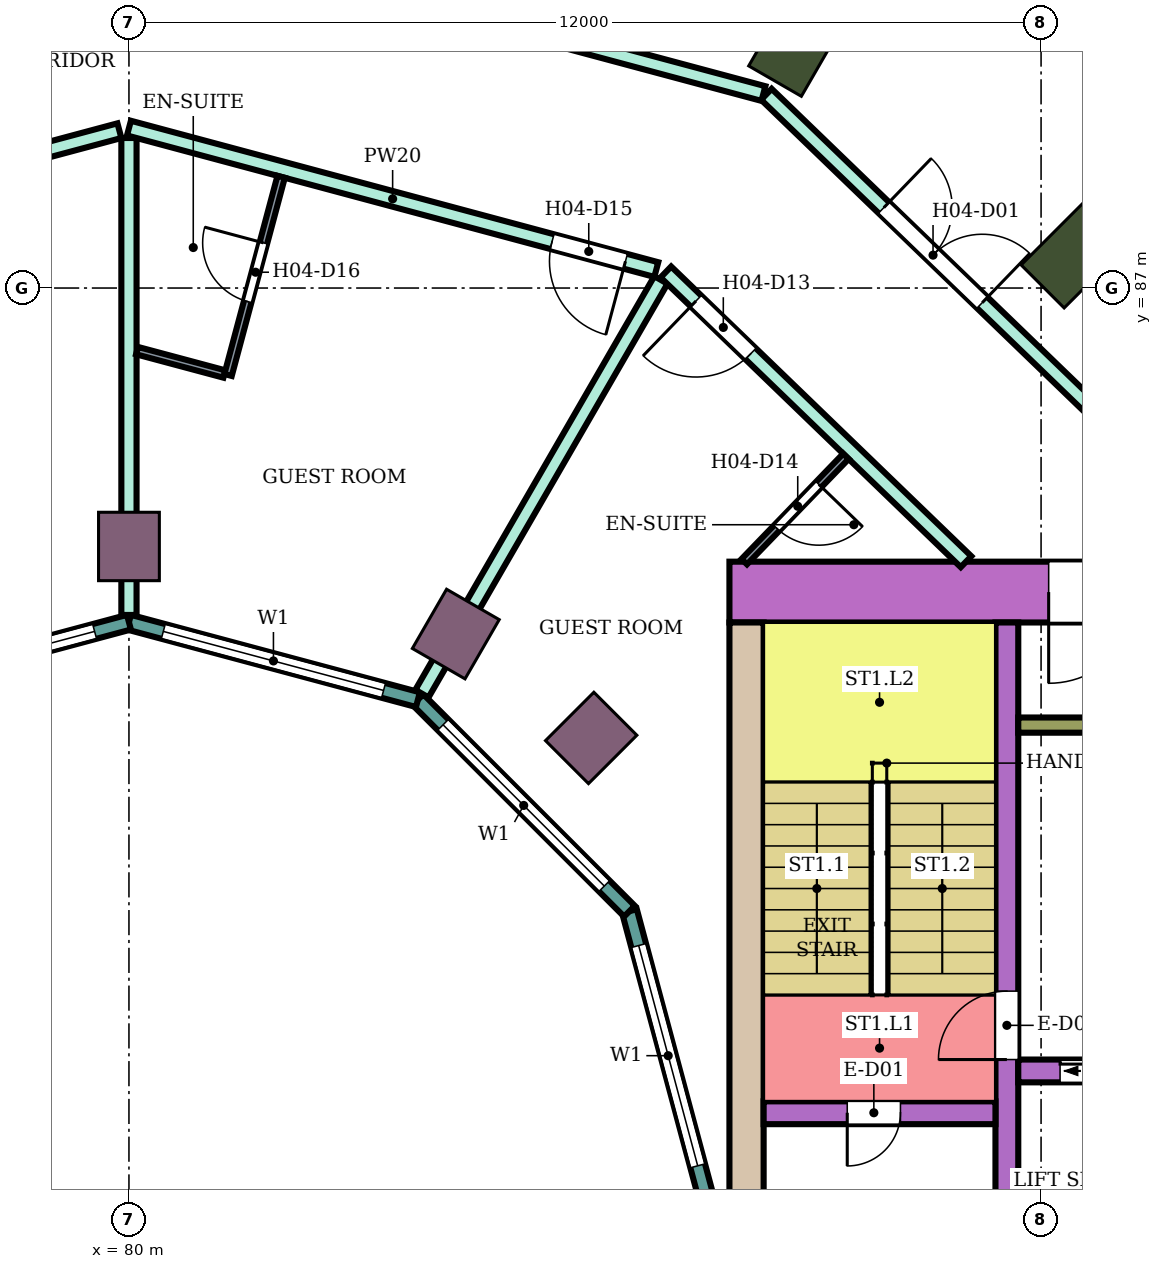
"""IFC4 building model, lengths in metres.
Left out: names, types, materials, properties, quantities, classifications, styles, units other than length and angle.
Written with IfcOpenShell. Run it as: python <this file> out.ifc"""

import sys

from ifc_helpers import new_model, si_unit, direction, frame, frame_2d, origin, origin_2d, place, context, subcontext, project, spatial, rectangle, extrude, element, fill, save


model = new_model("IFC4")
c1 = context("Model", 3, precision=1e-05, world=origin(), true_north=direction((0.0, 1.0)))
c2 = subcontext(c1, "Body", "Model", "MODEL_VIEW")
j1 = project(units=[si_unit("LENGTHUNIT", "METRE"), si_unit("PLANEANGLEUNIT", "RADIAN")], contexts=[c1])
p1 = place(None, origin())
s1 = spatial("IfcSite", under=j1, at=p1, CompositionType="ELEMENT")
p2 = place(p1, origin())
s2 = spatial("IfcBuilding", under=s1, at=p2, CompositionType="ELEMENT")
p3 = place(p2, frame((0.0, 0.0, 63.0)))
s3 = spatial("IfcBuildingStorey", under=s2, at=p3, CompositionType="ELEMENT", Elevation=63.0)
for number, where, z_axis, x_axis in (
    (1, (92.445, 87.445, 0.0), (0.0, 0.0, 1.0), (0.707, 0.707, 0.0)),
    (2, (88.8, 90.242, 0.0), (0.0, 0.0, 1.0), (0.5, 0.866, 0.0)),
):
    element("IfcColumn", number, at=place(p3, frame(where, z_axis=z_axis, x_axis=x_axis)), inside=s3, PredefinedType="COLUMN", context=c2, shape_type="SweptSolid", body=[
        extrude(rectangle(XDim=1.2, YDim=0.8, at=origin_2d()), origin(), (0.0, 0.0, 1.0), 3.8),
    ])
for number, where, z_axis, x_axis in (
    (3, (86.081, 81.081, 0.0), (0.0, 0.0, 1.0), (0.707, 0.707, 0.0)),
    (4, (84.3, 82.448, 0.0), (0.0, 0.0, 1.0), (0.5, 0.866, 0.0)),
    (5, (80.0, 83.6, 0.0), (0.0, 0.0, 1.0), (0.0, 1.0, 0.0)),
):
    element("IfcColumn", number, at=place(p3, frame(where, z_axis=z_axis, x_axis=x_axis)), inside=s3, PredefinedType="COLUMN", context=c2, shape_type="SweptSolid", body=[
        extrude(rectangle(XDim=0.9, YDim=0.8, at=origin_2d()), origin(), (0.0, 0.0, 1.0), 3.8),
    ])
p4 = place(p3, frame((87.9, 83.0, 0.0), z_axis=(0.0, 0.0, 1.0), x_axis=(1.0, 0.0, 0.0)))
e6 = element("IfcWall", 6, at=p4, inside=s3, PredefinedType="SHEAR", context=c2, shape_type="SweptSolid", body=[
    extrude(rectangle(XDim=14.7, YDim=0.8, at=frame_2d((7.35, 0.0))), origin(), (0.0, 0.0, 1.0), 3.48),
])
p5 = place(p4, frame((4.2, 0.0, 0.0)))
e7 = element("IfcOpeningElement", 7, at=p5, cuts=e6, PredefinedType="OPENING", context=c2, shape_type="SweptSolid", body=[
    extrude(rectangle(XDim=2.4, YDim=2.4, at=frame_2d((1.2, 1.2))), frame((0.0, 0.41, 0.0), z_axis=(0.0, -1.0, 0.0), x_axis=(1.0, 0.0, 0.0)), (0.0, 0.0, 1.0), 0.82),
])
p6 = place(p3, frame((88.125, 75.0, 0.0), z_axis=(0.0, 0.0, 1.0), x_axis=(0.0, 1.0, 0.0)))
e8 = element("IfcWall", 8, at=p6, inside=s3, PredefinedType="SHEAR", context=c2, shape_type="SweptSolid", body=[
    extrude(rectangle(XDim=7.6, YDim=0.45, at=frame_2d((3.8, 0.0))), origin(), (0.0, 0.0, 1.0), 3.48),
])
p7 = place(p3, frame((91.55, 75.0, 0.0), z_axis=(0.0, 0.0, 1.0), x_axis=(0.0, 1.0, 0.0)))
e9 = element("IfcWall", 9, at=p7, inside=s3, PredefinedType="SHEAR", context=c2, shape_type="SweptSolid", body=[
    extrude(rectangle(XDim=7.6, YDim=0.3, at=frame_2d((3.8, 0.0))), origin(), (0.0, 0.0, 1.0), 3.48),
])
p8 = place(p7, frame((1.85, 0.0, 0.0)))
e10 = element("IfcOpeningElement", 10, at=p8, cuts=e9, PredefinedType="OPENING", context=c2, shape_type="SweptSolid", body=[
    extrude(rectangle(XDim=0.9, YDim=2.1, at=frame_2d((0.45, 1.05))), frame((0.0, 0.16, 0.0), z_axis=(0.0, -1.0, 0.0), x_axis=(1.0, 0.0, 0.0)), (0.0, 0.0, 1.0), 0.32),
])
p9 = place(p3, frame((88.35, 76.15, 0.0), z_axis=(0.0, 0.0, 1.0), x_axis=(1.0, 0.0, 0.0)))
e11 = element("IfcWall", 11, at=p9, inside=s3, PredefinedType="SHEAR", context=c2, shape_type="SweptSolid", body=[
    extrude(rectangle(XDim=3.05, YDim=0.3, at=frame_2d((1.525, 0.0))), origin(), (0.0, 0.0, 1.0), 3.48),
])
p10 = place(p9, frame((1.1, 0.0, 0.0)))
e12 = element("IfcOpeningElement", 12, at=p10, cuts=e11, PredefinedType="OPENING", context=c2, shape_type="SweptSolid", body=[
    extrude(rectangle(XDim=0.7, YDim=2.0, at=frame_2d((0.35, 1.0))), frame((0.0, 0.16, 0.0), z_axis=(0.0, -1.0, 0.0), x_axis=(1.0, 0.0, 0.0)), (0.0, 0.0, 1.0), 0.32),
])
p11 = place(p3, frame((91.7, 76.7, 0.0), z_axis=(0.0, 0.0, 1.0), x_axis=(1.0, 0.0, 0.0)))
e13 = element("IfcWall", 13, at=p11, inside=s3, PredefinedType="SHEAR", context=c2, shape_type="SweptSolid", body=[
    extrude(rectangle(XDim=10.9, YDim=0.3, at=frame_2d((5.45, 0.0))), origin(), (0.0, 0.0, 1.0), 3.48),
])
p12 = place(p11, frame((0.55, 0.0, 0.0)))
e14 = element("IfcOpeningElement", 14, at=p12, cuts=e13, PredefinedType="OPENING", context=c2, shape_type="SweptSolid", body=[
    extrude(rectangle(XDim=1.1, YDim=2.1, at=frame_2d((0.55, 1.05))), frame((0.0, 0.16, 0.0), z_axis=(0.0, -1.0, 0.0), x_axis=(1.0, 0.0, 0.0)), (0.0, 0.0, 1.0), 0.32),
])
p13 = place(p11, frame((8.1, 0.0, 0.0)))
e15 = element("IfcOpeningElement", 15, at=p13, cuts=e13, PredefinedType="OPENING", context=c2, shape_type="SweptSolid", body=[
    extrude(rectangle(XDim=1.0, YDim=2.1, at=frame_2d((0.5, 1.05))), frame((0.0, 0.16, 0.0), z_axis=(0.0, -1.0, 0.0), x_axis=(1.0, 0.0, 0.0)), (0.0, 0.0, 1.0), 0.32),
])
p14 = place(p3, frame((91.7, 81.25, 0.0), z_axis=(0.0, 0.0, 1.0), x_axis=(1.0, 0.0, 0.0)))
e16 = element("IfcWall", 16, at=p14, inside=s3, PredefinedType="SHEAR", context=c2, shape_type="SweptSolid", body=[
    extrude(rectangle(XDim=4.65, YDim=0.2, at=frame_2d((2.325, 0.0))), origin(), (0.0, 0.0, 1.0), 3.48),
])
p15 = place(p3, frame((87.604, 75.0, 0.0), z_axis=(0.0, 0.0, 1.0), x_axis=(-0.258789828301, 0.965933654434, 0.0)))
e17 = element("IfcWall", 17, at=p15, inside=s3, PredefinedType="NOTDEFINED", context=c2, shape_type="SweptSolid", body=[
    extrude(rectangle(XDim=3.936, YDim=0.2, at=frame_2d((1.968, 0.0))), origin(), (0.0, 0.0, 1.0), 3.8),
])
p16 = place(p15, frame((0.468, 0.0, 0.9)))
e18 = element("IfcOpeningElement", 18, at=p16, cuts=e17, PredefinedType="OPENING", context=c2, shape_type="SweptSolid", body=[
    extrude(rectangle(XDim=3.0, YDim=2.3, at=frame_2d((1.5, 1.15))), frame((0.0, 0.11, 0.0), z_axis=(0.0, -1.0, 0.0), x_axis=(1.0, 0.0, 0.0)), (0.0, 0.0, 1.0), 0.22),
])
p17 = place(p3, frame((86.585, 78.802, 0.0), z_axis=(0.0, 0.0, 1.0), x_axis=(-0.707106781187, 0.707106781187, 0.0)))
e19 = element("IfcWall", 19, at=p17, inside=s3, PredefinedType="NOTDEFINED", context=c2, shape_type="SweptSolid", body=[
    extrude(rectangle(XDim=3.936, YDim=0.2, at=frame_2d((1.968, 0.0))), origin(), (0.0, 0.0, 1.0), 3.8),
])
p18 = place(p17, frame((0.468, 0.0, 0.9)))
e20 = element("IfcOpeningElement", 20, at=p18, cuts=e19, PredefinedType="OPENING", context=c2, shape_type="SweptSolid", body=[
    extrude(rectangle(XDim=3.0, YDim=2.3, at=frame_2d((1.5, 1.15))), frame((0.0, 0.11, 0.0), z_axis=(0.0, -1.0, 0.0), x_axis=(1.0, 0.0, 0.0)), (0.0, 0.0, 1.0), 0.22),
])
p19 = place(p3, frame((83.802, 81.585, 0.0), z_axis=(0.0, 0.0, 1.0), x_axis=(-0.965933654434, 0.258789828301, 0.0)))
e21 = element("IfcWall", 21, at=p19, inside=s3, PredefinedType="NOTDEFINED", context=c2, shape_type="SweptSolid", body=[
    extrude(rectangle(XDim=3.936, YDim=0.2, at=frame_2d((1.968, 0.0))), origin(), (0.0, 0.0, 1.0), 3.8),
])
p20 = place(p19, frame((0.468, 0.0, 0.9)))
e22 = element("IfcOpeningElement", 22, at=p20, cuts=e21, PredefinedType="OPENING", context=c2, shape_type="SweptSolid", body=[
    extrude(rectangle(XDim=3.0, YDim=2.3, at=frame_2d((1.5, 1.15))), frame((0.0, 0.11, 0.0), z_axis=(0.0, -1.0, 0.0), x_axis=(1.0, 0.0, 0.0)), (0.0, 0.0, 1.0), 0.22),
])
p21 = place(p3, frame((80.0, 82.604, 0.0), z_axis=(0.0, 0.0, 1.0), x_axis=(-0.965933654434, -0.258789828301, 0.0)))
e23 = element("IfcWall", 23, at=p21, inside=s3, PredefinedType="NOTDEFINED", context=c2, shape_type="SweptSolid", body=[
    extrude(rectangle(XDim=3.936, YDim=0.2, at=frame_2d((1.968, 0.0))), origin(), (0.0, 0.0, 1.0), 3.8),
])
p22 = place(p21, frame((0.468, 0.0, 0.9)))
e24 = element("IfcOpeningElement", 24, at=p22, cuts=e23, PredefinedType="OPENING", context=c2, shape_type="SweptSolid", body=[
    extrude(rectangle(XDim=3.0, YDim=2.3, at=frame_2d((1.5, 1.15))), frame((0.0, 0.11, 0.0), z_axis=(0.0, -1.0, 0.0), x_axis=(1.0, 0.0, 0.0)), (0.0, 0.0, 1.0), 0.22),
])
p23 = place(p3, frame((71.614, 89.55, 0.0), z_axis=(0.0, 0.0, 1.0), x_axis=(0.965982156828, 0.258608725086, 0.0)))
e25 = element("IfcWall", 25, at=p23, inside=s3, PredefinedType="PARTITIONING", context=c2, shape_type="SweptSolid", body=[
    extrude(rectangle(XDim=8.592, YDim=0.2, at=frame_2d((4.296, 0.0))), origin(), (0.0, 0.0, 1.0), 3.35),
])
p24 = place(p23, frame((4.865, 0.0, 0.0)))
e26 = element("IfcOpeningElement", 26, at=p24, cuts=e25, PredefinedType="OPENING", context=c2, shape_type="SweptSolid", body=[
    extrude(rectangle(XDim=1.0, YDim=2.1, at=frame_2d((0.5, 1.05))), frame((0.0, 0.11, 0.0), z_axis=(0.0, -1.0, 0.0), x_axis=(1.0, 0.0, 0.0)), (0.0, 0.0, 1.0), 0.22),
])
p25 = place(p23, frame((2.804, 0.0, 0.0)))
e27 = element("IfcOpeningElement", 27, at=p25, cuts=e25, PredefinedType="OPENING", context=c2, shape_type="SweptSolid", body=[
    extrude(rectangle(XDim=1.0, YDim=2.1, at=frame_2d((0.5, 1.05))), frame((0.0, 0.11, 0.0), z_axis=(0.0, -1.0, 0.0), x_axis=(1.0, 0.0, 0.0)), (0.0, 0.0, 1.0), 0.22),
])
p26 = place(p3, frame((73.071, 87.247, 0.0), z_axis=(0.0, 0.0, 1.0), x_axis=(0.965914318977, 0.258861987157, 0.0)))
e28 = element("IfcWall", 28, at=p26, inside=s3, PredefinedType="PARTITIONING", context=c2, shape_type="SweptSolid", body=[
    extrude(rectangle(XDim=7.043, YDim=0.2, at=frame_2d((3.521, 0.0))), origin(), (0.0, 0.0, 1.0), 3.35),
])
p27 = place(p26, frame((3.067, 0.0, 0.0)))
e29 = element("IfcOpeningElement", 29, at=p27, cuts=e28, PredefinedType="OPENING", context=c2, shape_type="SweptSolid", body=[
    extrude(rectangle(XDim=0.9, YDim=2.1, at=frame_2d((0.45, 1.05))), frame((0.0, 0.11, 0.0), z_axis=(0.0, -1.0, 0.0), x_axis=(1.0, 0.0, 0.0)), (0.0, 0.0, 1.0), 0.22),
])
p28 = place(p3, frame((80.0, 82.699, 0.0), z_axis=(0.0, 0.0, 1.0), x_axis=(0.0, 1.0, 0.0)))
e30 = element("IfcWall", 30, at=p28, inside=s3, PredefinedType="PARTITIONING", context=c2, shape_type="SweptSolid", body=[
    extrude(rectangle(XDim=6.275, YDim=0.2, at=frame_2d((3.138, 0.0))), origin(), (0.0, 0.0, 1.0), 3.35),
])
p29 = place(p3, frame((80.0, 89.104, 0.0), z_axis=(0.0, 0.0, 1.0), x_axis=(0.965854247166, -0.25908603442, 0.0)))
e31 = element("IfcWall", 31, at=p29, inside=s3, PredefinedType="PARTITIONING", context=c2, shape_type="SweptSolid", body=[
    extrude(rectangle(XDim=7.183, YDim=0.2, at=frame_2d((3.592, 0.0))), origin(), (0.0, 0.0, 1.0), 3.35),
])
p30 = place(p29, frame((5.763, 0.0, 0.0)))
e32 = element("IfcOpeningElement", 32, at=p30, cuts=e31, PredefinedType="OPENING", context=c2, shape_type="SweptSolid", body=[
    extrude(rectangle(XDim=1.0, YDim=2.1, at=frame_2d((0.5, 1.05))), frame((0.0, 0.11, 0.0), z_axis=(0.0, -1.0, 0.0), x_axis=(1.0, 0.0, 0.0)), (0.0, 0.0, 1.0), 0.22),
])
p31 = place(p3, frame((80.0, 91.796, 0.0), z_axis=(0.0, 0.0, 1.0), x_axis=(0.965891796243, -0.258946013582, 0.0)))
e33 = element("IfcWall", 33, at=p31, inside=s3, PredefinedType="PARTITIONING", context=c2, shape_type="SweptSolid", body=[
    extrude(rectangle(XDim=8.642, YDim=0.2, at=frame_2d((4.321, 0.0))), origin(), (0.0, 0.0, 1.0), 3.35),
])
p32 = place(p31, frame((2.817, 0.0, 0.0)))
e34 = element("IfcOpeningElement", 34, at=p32, cuts=e33, PredefinedType="OPENING", context=c2, shape_type="SweptSolid", body=[
    extrude(rectangle(XDim=1.0, YDim=2.1, at=frame_2d((0.5, 1.05))), frame((0.0, 0.11, 0.0), z_axis=(0.0, -1.0, 0.0), x_axis=(1.0, 0.0, 0.0)), (0.0, 0.0, 1.0), 0.22),
])
p33 = place(p3, frame((83.854, 81.664, 0.0), z_axis=(0.0, 0.0, 1.0), x_axis=(0.500224530691, 0.865895732115, 0.0)))
e35 = element("IfcWall", 35, at=p33, inside=s3, PredefinedType="PARTITIONING", context=c2, shape_type="SweptSolid", body=[
    extrude(rectangle(XDim=6.285, YDim=0.2, at=frame_2d((3.143, 0.0))), origin(), (0.0, 0.0, 1.0), 3.35),
])
p34 = place(p3, frame((87.064, 87.211, 0.0), z_axis=(0.0, 0.0, 1.0), x_axis=(0.719540958932, -0.694450004262, 0.0)))
e36 = element("IfcWall", 36, at=p34, inside=s3, PredefinedType="PARTITIONING", context=c2, shape_type="SweptSolid", body=[
    extrude(rectangle(XDim=5.488, YDim=0.2, at=frame_2d((2.744, 0.0))), origin(), (0.0, 0.0, 1.0), 3.35),
])
p35 = place(p34, frame((0.55, 0.0, 0.0)))
e37 = element("IfcOpeningElement", 37, at=p35, cuts=e36, PredefinedType="OPENING", context=c2, shape_type="SweptSolid", body=[
    extrude(rectangle(XDim=1.0, YDim=2.1, at=frame_2d((0.5, 1.05))), frame((0.0, 0.11, 0.0), z_axis=(0.0, -1.0, 0.0), x_axis=(1.0, 0.0, 0.0)), (0.0, 0.0, 1.0), 0.22),
])
p36 = place(p3, frame((88.386, 89.549, 0.0), z_axis=(0.0, 0.0, 1.0), x_axis=(0.719560576741, -0.694429677073, 0.0)))
e38 = element("IfcWall", 38, at=p36, inside=s3, PredefinedType="PARTITIONING", context=c2, shape_type="SweptSolid", body=[
    extrude(rectangle(XDim=6.635, YDim=0.2, at=frame_2d((3.318, 0.0))), origin(), (0.0, 0.0, 1.0), 3.35),
])
p37 = place(p36, frame((2.147, 0.0, 0.0)))
e39 = element("IfcOpeningElement", 39, at=p37, cuts=e38, PredefinedType="OPENING", context=c2, shape_type="SweptSolid", body=[
    extrude(rectangle(XDim=1.8, YDim=2.1, at=frame_2d((0.9, 1.05))), frame((0.0, 0.11, 0.0), z_axis=(0.0, -1.0, 0.0), x_axis=(1.0, 0.0, 0.0)), (0.0, 0.0, 1.0), 0.22),
])
p38 = place(p3, frame((80.106, 86.177, 0.0), z_axis=(0.0, 0.0, 1.0), x_axis=(0.966002973184, -0.258530957139, 0.0)))
e40 = element("IfcWall", 40, at=p38, inside=s3, PredefinedType="PARTITIONING", context=c2, shape_type="SweptSolid", body=[
    extrude(rectangle(XDim=1.19, YDim=0.1, at=frame_2d((0.595, 0.0))), origin(), (0.0, 0.0, 1.0), 3.35),
])
p39 = place(p3, frame((81.304, 85.856, 0.0), z_axis=(0.0, 0.0, 1.0), x_axis=(0.25867580527, 0.965964195904, 0.0)))
e41 = element("IfcWall", 41, at=p39, inside=s3, PredefinedType="PARTITIONING", context=c2, shape_type="SweptSolid", body=[
    extrude(rectangle(XDim=2.699, YDim=0.1, at=frame_2d((1.35, 0.0))), origin(), (0.0, 0.0, 1.0), 3.35),
])
p40 = place(p39, frame((1.0, 0.0, 0.0)))
e42 = element("IfcOpeningElement", 42, at=p40, cuts=e41, PredefinedType="OPENING", context=c2, shape_type="SweptSolid", body=[
    extrude(rectangle(XDim=0.8, YDim=2.1, at=frame_2d((0.4, 1.05))), frame((0.0, 0.06, 0.0), z_axis=(0.0, -1.0, 0.0), x_axis=(1.0, 0.0, 0.0)), (0.0, 0.0, 1.0), 0.12),
])
p41 = place(p3, frame((88.095, 83.4, 0.0), z_axis=(0.0, 0.0, 1.0), x_axis=(0.694447472534, 0.719543402368, 0.0)))
e43 = element("IfcWall", 43, at=p41, inside=s3, PredefinedType="PARTITIONING", context=c2, shape_type="SweptSolid", body=[
    extrude(rectangle(XDim=1.926, YDim=0.1, at=frame_2d((0.963, 0.0))), origin(), (0.0, 0.0, 1.0), 3.35),
])
p42 = place(p41, frame((0.613, 0.0, 0.0)))
e44 = element("IfcOpeningElement", 44, at=p42, cuts=e43, PredefinedType="OPENING", context=c2, shape_type="SweptSolid", body=[
    extrude(rectangle(XDim=0.8, YDim=2.1, at=frame_2d((0.4, 1.05))), frame((0.0, 0.06, 0.0), z_axis=(0.0, -1.0, 0.0), x_axis=(1.0, 0.0, 0.0)), (0.0, 0.0, 1.0), 0.12),
])
p43 = place(p16, origin())
e45 = element("IfcWindow", 45, at=p43, inside=s3, PartitioningType="SINGLE_PANEL", PredefinedType="WINDOW", context=c2, shape_type="SweptSolid", body=[
    extrude(rectangle(XDim=3.0, YDim=2.3, at=frame_2d((1.5, 1.15))), frame((0.0, 0.03, 0.0), z_axis=(0.0, -1.0, 0.0), x_axis=(1.0, 0.0, 0.0)), (0.0, 0.0, 1.0), 0.06),
])
fill(e18, e45)
p44 = place(p18, origin())
e46 = element("IfcWindow", 46, at=p44, inside=s3, PartitioningType="SINGLE_PANEL", PredefinedType="WINDOW", context=c2, shape_type="SweptSolid", body=[
    extrude(rectangle(XDim=3.0, YDim=2.3, at=frame_2d((1.5, 1.15))), frame((0.0, 0.03, 0.0), z_axis=(0.0, -1.0, 0.0), x_axis=(1.0, 0.0, 0.0)), (0.0, 0.0, 1.0), 0.06),
])
fill(e20, e46)
p45 = place(p20, origin())
e47 = element("IfcWindow", 47, at=p45, inside=s3, PartitioningType="SINGLE_PANEL", PredefinedType="WINDOW", context=c2, shape_type="SweptSolid", body=[
    extrude(rectangle(XDim=3.0, YDim=2.3, at=frame_2d((1.5, 1.15))), frame((0.0, 0.03, 0.0), z_axis=(0.0, -1.0, 0.0), x_axis=(1.0, 0.0, 0.0)), (0.0, 0.0, 1.0), 0.06),
])
fill(e22, e47)
p46 = place(p22, origin())
e48 = element("IfcWindow", 48, at=p46, inside=s3, PartitioningType="SINGLE_PANEL", PredefinedType="WINDOW", context=c2, shape_type="SweptSolid", body=[
    extrude(rectangle(XDim=3.0, YDim=2.3, at=frame_2d((1.5, 1.15))), frame((0.0, 0.03, 0.0), z_axis=(0.0, -1.0, 0.0), x_axis=(1.0, 0.0, 0.0)), (0.0, 0.0, 1.0), 0.06),
])
fill(e24, e48)
p47 = place(p37, origin())
e49 = element("IfcDoor", 49, at=p47, inside=s3, OperationType="DOUBLE_DOOR_SINGLE_SWING", PredefinedType="DOOR", context=c2, shape_type="SweptSolid", body=[
    extrude(rectangle(XDim=1.8, YDim=2.1, at=frame_2d((0.9, 1.05))), frame((0.0, 0.025, 0.0), z_axis=(0.0, -1.0, 0.0), x_axis=(1.0, 0.0, 0.0)), (0.0, 0.0, 1.0), 0.05),
])
fill(e39, e49)
p48 = place(p35, frame((1.0, 0.0, 0.0), z_axis=(0.0, 0.0, 1.0), x_axis=(-1.0, 0.0, 0.0)))
e50 = element("IfcDoor", 50, at=p48, inside=s3, OperationType="SINGLE_SWING_RIGHT", PredefinedType="DOOR", context=c2, shape_type="SweptSolid", body=[
    extrude(rectangle(XDim=1.0, YDim=2.1, at=frame_2d((0.5, 1.05))), frame((0.0, 0.025, 0.0), z_axis=(0.0, -1.0, 0.0), x_axis=(1.0, 0.0, 0.0)), (0.0, 0.0, 1.0), 0.05),
])
fill(e37, e50)
p49 = place(p42, frame((0.8, 0.0, 0.0), z_axis=(0.0, 0.0, 1.0), x_axis=(-1.0, 0.0, 0.0)))
e51 = element("IfcDoor", 51, at=p49, inside=s3, OperationType="SINGLE_SWING_LEFT", PredefinedType="DOOR", context=c2, shape_type="SweptSolid", body=[
    extrude(rectangle(XDim=0.8, YDim=2.1, at=frame_2d((0.4, 1.05))), frame((0.0, 0.025, 0.0), z_axis=(0.0, -1.0, 0.0), x_axis=(1.0, 0.0, 0.0)), (0.0, 0.0, 1.0), 0.05),
])
fill(e44, e51)
p50 = place(p30, frame((1.0, 0.0, 0.0), z_axis=(0.0, 0.0, 1.0), x_axis=(-1.0, 0.0, 0.0)))
e52 = element("IfcDoor", 52, at=p50, inside=s3, OperationType="SINGLE_SWING_LEFT", PredefinedType="DOOR", context=c2, shape_type="SweptSolid", body=[
    extrude(rectangle(XDim=1.0, YDim=2.1, at=frame_2d((0.5, 1.05))), frame((0.0, 0.025, 0.0), z_axis=(0.0, -1.0, 0.0), x_axis=(1.0, 0.0, 0.0)), (0.0, 0.0, 1.0), 0.05),
])
fill(e32, e52)
p51 = place(p40, origin())
e53 = element("IfcDoor", 53, at=p51, inside=s3, OperationType="SINGLE_SWING_RIGHT", PredefinedType="DOOR", context=c2, shape_type="SweptSolid", body=[
    extrude(rectangle(XDim=0.8, YDim=2.1, at=frame_2d((0.4, 1.05))), frame((0.0, 0.025, 0.0), z_axis=(0.0, -1.0, 0.0), x_axis=(1.0, 0.0, 0.0)), (0.0, 0.0, 1.0), 0.05),
])
fill(e42, e53)
p52 = place(p10, frame((0.7, 0.0, 0.0), z_axis=(0.0, 0.0, 1.0), x_axis=(-1.0, 0.0, 0.0)))
e54 = element("IfcDoor", 54, at=p52, inside=s3, OperationType="SINGLE_SWING_RIGHT", PredefinedType="DOOR", context=c2, shape_type="SweptSolid", body=[
    extrude(rectangle(XDim=0.7, YDim=2.0, at=frame_2d((0.35, 1.0))), frame((0.0, 0.025, 0.0), z_axis=(0.0, -1.0, 0.0), x_axis=(1.0, 0.0, 0.0)), (0.0, 0.0, 1.0), 0.05),
])
fill(e12, e54)
p53 = place(p8, origin())
e55 = element("IfcDoor", 55, at=p53, inside=s3, OperationType="SINGLE_SWING_LEFT", PredefinedType="DOOR", context=c2, shape_type="SweptSolid", body=[
    extrude(rectangle(XDim=0.9, YDim=2.1, at=frame_2d((0.45, 1.05))), frame((0.0, 0.025, 0.0), z_axis=(0.0, -1.0, 0.0), x_axis=(1.0, 0.0, 0.0)), (0.0, 0.0, 1.0), 0.05),
])
fill(e10, e55)
p54 = place(p12, origin())
e56 = element("IfcDoor", 56, at=p54, inside=s3, OperationType="DOUBLE_DOOR_SLIDING", PredefinedType="DOOR", context=c2, shape_type="SweptSolid", body=[
    extrude(rectangle(XDim=1.1, YDim=2.1, at=frame_2d((0.55, 1.05))), frame((0.0, 0.025, 0.0), z_axis=(0.0, -1.0, 0.0), x_axis=(1.0, 0.0, 0.0)), (0.0, 0.0, 1.0), 0.05),
])
fill(e14, e56)
p55 = place(p5, frame((2.4, 0.0, 0.0), z_axis=(0.0, 0.0, 1.0), x_axis=(-1.0, 0.0, 0.0)))
e57 = element("IfcDoor", 57, at=p55, inside=s3, OperationType="DOUBLE_DOOR_SINGLE_SWING", PredefinedType="DOOR", context=c2, shape_type="SweptSolid", body=[
    extrude(rectangle(XDim=2.4, YDim=2.4, at=frame_2d((1.2, 1.2))), frame((0.0, 0.025, 0.0), z_axis=(0.0, -1.0, 0.0), x_axis=(1.0, 0.0, 0.0)), (0.0, 0.0, 1.0), 0.05),
])
fill(e7, e57)
save(model, sys.argv[1])
